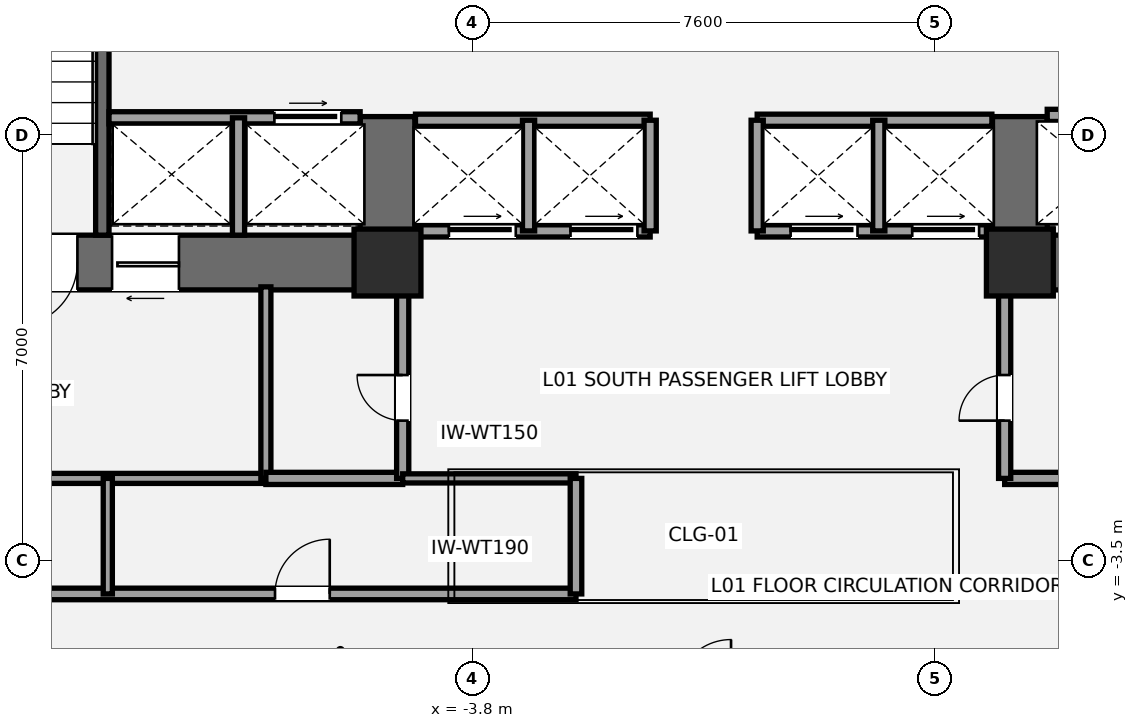
"""IFC4 building model, lengths in metres.
Left out: names, types, materials, properties, quantities, classifications, styles, units other than length and angle.
Written with IfcOpenShell. Run it as: python <this file> out.ifc"""

import sys

from ifc_helpers import new_model, si_unit, direction, frame, frame_2d, origin, origin_2d, place, context, subcontext, project, spatial, rectangle, extrude, element, fill, save


model = new_model("IFC4")
c1 = context("Model", 3, precision=1e-05, world=origin(), true_north=direction((0.0, 1.0)))
c2 = subcontext(c1, "Body", "Model", "MODEL_VIEW")
j1 = project(units=[si_unit("LENGTHUNIT", "METRE"), si_unit("PLANEANGLEUNIT", "RADIAN")], contexts=[c1])
p1 = place(None, origin())
s1 = spatial("IfcSite", under=j1, at=p1, CompositionType="ELEMENT")
p2 = place(p1, origin())
s2 = spatial("IfcBuilding", under=s1, at=p2, CompositionType="ELEMENT")
p3 = place(p2, frame((0.0, 0.0, 6.0)))
s3 = spatial("IfcBuildingStorey", under=s2, at=p3, CompositionType="ELEMENT", Elevation=6.0)
p4 = place(p3, frame((-4.75, 1.4, 0.0), z_axis=(0.0, 0.0, 1.0), x_axis=(-1.0, 0.0, 0.0)))
e1 = element("IfcWall", 1, at=p4, inside=s3, PredefinedType="SHEAR", context=c2, shape_type="SweptSolid", body=[
    extrude(rectangle(XDim=9.3, YDim=0.9, at=frame_2d((4.65, 0.0))), origin(), (0.0, 0.0, 1.0), 4.2),
])
p5 = place(p4, frame((5.55, 0.0, 0.0)))
e2 = element("IfcOpeningElement", 2, at=p5, cuts=e1, PredefinedType="OPENING", context=c2, shape_type="SweptSolid", body=[
    extrude(rectangle(XDim=1.05, YDim=2.15, at=frame_2d((0.525, 1.075))), frame((0.0, 0.46, 0.0), z_axis=(0.0, -1.0, 0.0), x_axis=(1.0, 0.0, 0.0)), (0.0, 0.0, 1.0), 0.92),
])
p6 = place(p4, frame((3.88, 0.0, 0.0)))
e3 = element("IfcOpeningElement", 3, at=p6, cuts=e1, PredefinedType="OPENING", context=c2, shape_type="SweptSolid", body=[
    extrude(rectangle(XDim=1.1, YDim=2.2, at=frame_2d((0.55, 1.1))), frame((0.0, 0.46, 0.0), z_axis=(0.0, -1.0, 0.0), x_axis=(1.0, 0.0, 0.0)), (0.0, 0.0, 1.0), 0.92),
])
p7 = place(p3, frame((-5.2, 0.95, 0.0), z_axis=(0.0, 0.0, 1.0), x_axis=(0.0, 1.0, 0.0)))
e4 = element("IfcWall", 4, at=p7, inside=s3, PredefinedType="SHEAR", context=c2, shape_type="SweptSolid", body=[
    extrude(rectangle(XDim=2.85, YDim=0.9, at=frame_2d((1.425, 0.0))), origin(), (0.0, 0.0, 1.0), 4.2),
])
p8 = place(p3, frame((-9.89, 1.85, 0.0), z_axis=(0.0, 0.0, 1.0), x_axis=(0.0, 1.0, 0.0)))
e5 = element("IfcWall", 5, at=p8, inside=s3, PredefinedType="SHEAR", context=c2, shape_type="SweptSolid", body=[
    extrude(rectangle(XDim=7.15, YDim=0.22, at=frame_2d((3.575, 0.0))), origin(), (0.0, 0.0, 1.0), 4.2),
])
p9 = place(p3, frame((14.05, 1.4, 0.0), z_axis=(0.0, 0.0, 1.0), x_axis=(-1.0, 0.0, 0.0)))
e6 = element("IfcWall", 6, at=p9, inside=s3, PredefinedType="SHEAR", context=c2, shape_type="SweptSolid", body=[
    extrude(rectangle(XDim=9.3, YDim=0.9, at=frame_2d((4.65, 0.0))), origin(), (0.0, 0.0, 1.0), 4.2),
])
p10 = place(p9, frame((2.7, 0.0, 0.0)))
e7 = element("IfcOpeningElement", 7, at=p10, cuts=e6, PredefinedType="OPENING", context=c2, shape_type="SweptSolid", body=[
    extrude(rectangle(XDim=1.05, YDim=2.15, at=frame_2d((0.525, 1.075))), frame((0.0, 0.46, 0.0), z_axis=(0.0, -1.0, 0.0), x_axis=(1.0, 0.0, 0.0)), (0.0, 0.0, 1.0), 0.92),
])
p11 = place(p9, frame((4.7, 0.0, 0.0)))
e8 = element("IfcOpeningElement", 8, at=p11, cuts=e6, PredefinedType="OPENING", context=c2, shape_type="SweptSolid", body=[
    extrude(rectangle(XDim=1.1, YDim=2.2, at=frame_2d((0.55, 1.1))), frame((0.0, 0.46, 0.0), z_axis=(0.0, -1.0, 0.0), x_axis=(1.0, 0.0, 0.0)), (0.0, 0.0, 1.0), 0.92),
])
p12 = place(p3, frame((5.2, 0.95, 0.0), z_axis=(0.0, 0.0, 1.0), x_axis=(0.0, 1.0, 0.0)))
e9 = element("IfcWall", 9, at=p12, inside=s3, PredefinedType="SHEAR", context=c2, shape_type="SweptSolid", body=[
    extrude(rectangle(XDim=2.85, YDim=0.9, at=frame_2d((1.425, 0.0))), origin(), (0.0, 0.0, 1.0), 4.2),
])
for number, where, z_axis, x_axis in (
    (10, (-5.2, 1.4, 0.0), (0.0, 0.0, 1.0), (1.0, 0.0, 0.0)),
    (11, (5.2, 1.4, 0.0), (0.0, 0.0, 1.0), (1.0, 0.0, 0.0)),
):
    element("IfcColumn", number, at=place(p3, frame(where, z_axis=z_axis, x_axis=x_axis)), inside=s3, PredefinedType="COLUMN", context=c2, shape_type="SweptSolid", body=[
        extrude(rectangle(XDim=1.1, YDim=1.1, at=origin_2d()), origin(), (0.0, 0.0, 1.0), 4.2),
    ])
p13 = place(p3, frame((-13.45, -2.15, 0.0), z_axis=(0.0, 0.0, 1.0), x_axis=(1.0, 0.0, 0.0)))
e12 = element("IfcWall", 12, at=p13, inside=s3, PredefinedType="PARTITIONING", context=c2, shape_type="SweptSolid", body=[
    extrude(rectangle(XDim=6.25, YDim=0.165, at=frame_2d((3.125, 0.0))), origin(), (0.0, 0.0, 1.0), 3.98),
])
p14 = place(p3, frame((-7.2, -2.15, 0.0), z_axis=(0.0, 0.0, 1.0), x_axis=(0.0, 1.0, 0.0)))
e13 = element("IfcWall", 13, at=p14, inside=s3, PredefinedType="PARTITIONING", context=c2, shape_type="SweptSolid", body=[
    extrude(rectangle(XDim=3.15, YDim=0.165, at=frame_2d((1.575, 0.0))), origin(), (0.0, 0.0, 1.0), 3.98),
])
p15 = place(p3, frame((-7.2, -2.15, 0.0), z_axis=(0.0, 0.0, 1.0), x_axis=(1.0, 0.0, 0.0)))
e14 = element("IfcWall", 14, at=p15, inside=s3, PredefinedType="SOLIDWALL", context=c2, shape_type="SweptSolid", body=[
    extrude(rectangle(XDim=2.25, YDim=0.2, at=frame_2d((1.125, 0.0))), origin(), (0.0, 0.0, 1.0), 3.98),
])
p16 = place(p3, frame((-4.95, -2.15, 0.0), z_axis=(0.0, 0.0, 1.0), x_axis=(0.0, 1.0, 0.0)))
e15 = element("IfcWall", 15, at=p16, inside=s3, PredefinedType="SOLIDWALL", context=c2, shape_type="SweptSolid", body=[
    extrude(rectangle(XDim=3.15, YDim=0.2, at=frame_2d((1.575, 0.0))), origin(), (0.0, 0.0, 1.0), 3.348),
])
p17 = place(p16, frame((0.95, 0.0, 0.0)))
e16 = element("IfcOpeningElement", 16, at=p17, cuts=e15, PredefinedType="OPENING", context=c2, shape_type="SweptSolid", body=[
    extrude(rectangle(XDim=0.75, YDim=2.1, at=frame_2d((0.375, 1.05))), frame((0.0, 0.11, 0.0), z_axis=(0.0, -1.0, 0.0), x_axis=(1.0, 0.0, 0.0)), (0.0, 0.0, 1.0), 0.22),
])
p18 = place(p3, frame((4.95, -2.15, 0.0), z_axis=(0.0, 0.0, 1.0), x_axis=(1.0, 0.0, 0.0)))
e17 = element("IfcWall", 17, at=p18, inside=s3, PredefinedType="SOLIDWALL", context=c2, shape_type="SweptSolid", body=[
    extrude(rectangle(XDim=2.25, YDim=0.2, at=frame_2d((1.125, 0.0))), origin(), (0.0, 0.0, 1.0), 3.98),
])
p19 = place(p3, frame((4.95, -2.15, 0.0), z_axis=(0.0, 0.0, 1.0), x_axis=(0.0, 1.0, 0.0)))
e18 = element("IfcWall", 18, at=p19, inside=s3, PredefinedType="SOLIDWALL", context=c2, shape_type="SweptSolid", body=[
    extrude(rectangle(XDim=3.15, YDim=0.2, at=frame_2d((1.575, 0.0))), origin(), (0.0, 0.0, 1.0), 3.348),
])
p20 = place(p19, frame((0.95, 0.0, 0.0)))
e19 = element("IfcOpeningElement", 19, at=p20, cuts=e18, PredefinedType="OPENING", context=c2, shape_type="SweptSolid", body=[
    extrude(rectangle(XDim=0.75, YDim=2.1, at=frame_2d((0.375, 1.05))), frame((0.0, 0.11, 0.0), z_axis=(0.0, -1.0, 0.0), x_axis=(1.0, 0.0, 0.0)), (0.0, 0.0, 1.0), 0.22),
])
p21 = place(p3, frame((-9.78, 3.78, 0.0), z_axis=(0.0, 0.0, 1.0), x_axis=(1.0, 0.0, 0.0)))
e20 = element("IfcWall", 20, at=p21, inside=s3, PredefinedType="SOLIDWALL", context=c2, shape_type="SweptSolid", body=[
    extrude(rectangle(XDim=4.13, YDim=0.2, at=frame_2d((2.065, 0.0))), origin(), (0.0, 0.0, 1.0), 3.98),
])
p22 = place(p21, frame((2.72, 0.0, 0.0)))
e21 = element("IfcOpeningElement", 21, at=p22, cuts=e20, PredefinedType="OPENING", context=c2, shape_type="SweptSolid", body=[
    extrude(rectangle(XDim=1.1, YDim=2.2, at=frame_2d((0.55, 1.1))), frame((0.0, 0.11, 0.0), z_axis=(0.0, -1.0, 0.0), x_axis=(1.0, 0.0, 0.0)), (0.0, 0.0, 1.0), 0.22),
])
p23 = place(p3, frame((-7.65, 1.85, 0.0), z_axis=(0.0, 0.0, 1.0), x_axis=(0.0, 1.0, 0.0)))
e22 = element("IfcWall", 22, at=p23, inside=s3, PredefinedType="SOLIDWALL", context=c2, shape_type="SweptSolid", body=[
    extrude(rectangle(XDim=1.93, YDim=0.2, at=frame_2d((0.965, 0.0))), origin(), (0.0, 0.0, 1.0), 3.98),
])
p24 = place(p3, frame((5.65, 3.82, 0.0), z_axis=(0.0, 0.0, 1.0), x_axis=(1.0, 0.0, 0.0)))
e23 = element("IfcWall", 23, at=p24, inside=s3, PredefinedType="SOLIDWALL", context=c2, shape_type="SweptSolid", body=[
    extrude(rectangle(XDim=4.13, YDim=0.2, at=frame_2d((2.065, 0.0))), origin(), (0.0, 0.0, 1.0), 3.98),
])
p25 = place(p24, frame((0.65, 0.0, 0.0)))
e24 = element("IfcOpeningElement", 24, at=p25, cuts=e23, PredefinedType="OPENING", context=c2, shape_type="SweptSolid", body=[
    extrude(rectangle(XDim=1.2, YDim=2.2, at=frame_2d((0.6, 1.1))), frame((0.0, 0.11, 0.0), z_axis=(0.0, -1.0, 0.0), x_axis=(1.0, 0.0, 0.0)), (0.0, 0.0, 1.0), 0.22),
])
p26 = place(p3, frame((-4.74, 1.92, 0.0), z_axis=(0.0, 0.0, 1.0), x_axis=(1.0, 0.0, 0.0)))
e25 = element("IfcWall", 25, at=p26, inside=s3, PredefinedType="SOLIDWALL", context=c2, shape_type="SweptSolid", body=[
    extrude(rectangle(XDim=3.86, YDim=0.2, at=frame_2d((1.93, 0.0))), origin(), (0.0, 0.0, 1.0), 2.97),
])
p27 = place(p26, frame((0.55, 0.0, 0.0)))
e26 = element("IfcOpeningElement", 26, at=p27, cuts=e25, PredefinedType="OPENING", context=c2, shape_type="SweptSolid", body=[
    extrude(rectangle(XDim=1.1, YDim=2.2, at=frame_2d((0.55, 1.1))), frame((0.0, 0.11, 0.0), z_axis=(0.0, -1.0, 0.0), x_axis=(1.0, 0.0, 0.0)), (0.0, 0.0, 1.0), 0.22),
])
p28 = place(p26, frame((2.55, 0.0, 0.0)))
e27 = element("IfcOpeningElement", 27, at=p28, cuts=e25, PredefinedType="OPENING", context=c2, shape_type="SweptSolid", body=[
    extrude(rectangle(XDim=1.1, YDim=2.2, at=frame_2d((0.55, 1.1))), frame((0.0, 0.11, 0.0), z_axis=(0.0, -1.0, 0.0), x_axis=(1.0, 0.0, 0.0)), (0.0, 0.0, 1.0), 0.22),
])
p29 = place(p3, frame((0.88, 1.92, 0.0), z_axis=(0.0, 0.0, 1.0), x_axis=(1.0, 0.0, 0.0)))
e28 = element("IfcWall", 28, at=p29, inside=s3, PredefinedType="SOLIDWALL", context=c2, shape_type="SweptSolid", body=[
    extrude(rectangle(XDim=3.86, YDim=0.2, at=frame_2d((1.93, 0.0))), origin(), (0.0, 0.0, 1.0), 2.97),
])
p30 = place(p29, frame((0.55, 0.0, 0.0)))
e29 = element("IfcOpeningElement", 29, at=p30, cuts=e28, PredefinedType="OPENING", context=c2, shape_type="SweptSolid", body=[
    extrude(rectangle(XDim=1.1, YDim=2.2, at=frame_2d((0.55, 1.1))), frame((0.0, 0.11, 0.0), z_axis=(0.0, -1.0, 0.0), x_axis=(1.0, 0.0, 0.0)), (0.0, 0.0, 1.0), 0.22),
])
p31 = place(p29, frame((2.55, 0.0, 0.0)))
e30 = element("IfcOpeningElement", 30, at=p31, cuts=e28, PredefinedType="OPENING", context=c2, shape_type="SweptSolid", body=[
    extrude(rectangle(XDim=1.1, YDim=2.2, at=frame_2d((0.55, 1.1))), frame((0.0, 0.11, 0.0), z_axis=(0.0, -1.0, 0.0), x_axis=(1.0, 0.0, 0.0)), (0.0, 0.0, 1.0), 0.22),
])
for number, where, z_axis, x_axis in (
    (31, (-4.74, 3.74, 0.0), (0.0, 0.0, 1.0), (1.0, 0.0, 0.0)),
    (32, (0.88, 3.74, 0.0), (0.0, 0.0, 1.0), (1.0, 0.0, 0.0)),
):
    element("IfcWall", number, at=place(p3, frame(where, z_axis=z_axis, x_axis=x_axis)), inside=s3, PredefinedType="SOLIDWALL", context=c2, shape_type="SweptSolid", body=[
        extrude(rectangle(XDim=3.86, YDim=0.2, at=frame_2d((1.93, 0.0))), origin(), (0.0, 0.0, 1.0), 3.98),
    ])
for number, where, z_axis, x_axis in (
    (33, (-2.88, 1.92, 0.0), (0.0, 0.0, 1.0), (0.0, 1.0, 0.0)),
    (34, (2.88, 1.92, 0.0), (0.0, 0.0, 1.0), (0.0, 1.0, 0.0)),
    (35, (-0.88, 1.92, 0.0), (0.0, 0.0, 1.0), (0.0, 1.0, 0.0)),
    (36, (0.88, 1.92, 0.0), (0.0, 0.0, 1.0), (0.0, 1.0, 0.0)),
):
    element("IfcWall", number, at=place(p3, frame(where, z_axis=z_axis, x_axis=x_axis)), inside=s3, PredefinedType="SOLIDWALL", context=c2, shape_type="SweptSolid", body=[
        extrude(rectangle(XDim=1.82, YDim=0.2, at=frame_2d((0.91, 0.0))), origin(), (0.0, 0.0, 1.0), 3.98),
    ])
p32 = place(p3, frame((-13.45, -4.05, 0.0), z_axis=(0.0, 0.0, 1.0), x_axis=(1.0, 0.0, 0.0)))
e37 = element("IfcWall", 37, at=p32, inside=s3, PredefinedType="PLUMBINGWALL", context=c2, shape_type="SweptSolid", body=[
    extrude(rectangle(XDim=11.35, YDim=0.19, at=frame_2d((5.675, 0.0))), origin(), (0.0, 0.0, 1.0), 3.507),
])
p33 = place(p32, frame((1.25, 0.0, 0.0)))
e38 = element("IfcOpeningElement", 38, at=p33, cuts=e37, PredefinedType="OPENING", context=c2, shape_type="SweptSolid", body=[
    extrude(rectangle(XDim=0.95, YDim=2.15, at=frame_2d((0.475, 1.075))), frame((0.0, 0.105, 0.0), z_axis=(0.0, -1.0, 0.0), x_axis=(1.0, 0.0, 0.0)), (0.0, 0.0, 1.0), 0.21),
])
p34 = place(p32, frame((6.4, 0.0, 0.0)))
e39 = element("IfcOpeningElement", 39, at=p34, cuts=e37, PredefinedType="OPENING", context=c2, shape_type="SweptSolid", body=[
    extrude(rectangle(XDim=0.9, YDim=2.1, at=frame_2d((0.45, 1.05))), frame((0.0, 0.105, 0.0), z_axis=(0.0, -1.0, 0.0), x_axis=(1.0, 0.0, 0.0)), (0.0, 0.0, 1.0), 0.21),
])
p35 = place(p3, frame((-4.95, -2.15, 0.0), z_axis=(0.0, 0.0, 1.0), x_axis=(1.0, 0.0, 0.0)))
e40 = element("IfcWall", 40, at=p35, inside=s3, PredefinedType="PLUMBINGWALL", context=c2, shape_type="SweptSolid", body=[
    extrude(rectangle(XDim=2.85, YDim=0.15, at=frame_2d((1.425, 0.0))), origin(), (0.0, 0.0, 1.0), 3.98),
])
p36 = place(p3, frame((-2.1, -4.05, 0.0), z_axis=(0.0, 0.0, 1.0), x_axis=(0.0, 1.0, 0.0)))
e41 = element("IfcWall", 41, at=p36, inside=s3, PredefinedType="PLUMBINGWALL", context=c2, shape_type="SweptSolid", body=[
    extrude(rectangle(XDim=1.9, YDim=0.19, at=frame_2d((0.95, 0.0))), origin(), (0.0, 0.0, 1.0), 3.98),
])
p37 = place(p3, frame((-9.8, -4.05, 0.0), z_axis=(0.0, 0.0, 1.0), x_axis=(0.0, 1.0, 0.0)))
e42 = element("IfcWall", 42, at=p37, inside=s3, PredefinedType="PLUMBINGWALL", context=c2, shape_type="SweptSolid", body=[
    extrude(rectangle(XDim=1.9, YDim=0.15, at=frame_2d((0.95, 0.0))), origin(), (0.0, 0.0, 1.0), 3.98),
])
p38 = place(p5, origin())
e43 = element("IfcDoor", 43, at=p38, inside=s3, OperationType="SINGLE_SWING_RIGHT", PredefinedType="DOOR", context=c2, shape_type="SweptSolid", body=[
    extrude(rectangle(XDim=1.05, YDim=2.15, at=frame_2d((0.525, 1.075))), frame((0.0, 0.025, 0.0), z_axis=(0.0, -1.0, 0.0), x_axis=(1.0, 0.0, 0.0)), (0.0, 0.0, 1.0), 0.05),
])
fill(e2, e43)
p39 = place(p17, origin())
e44 = element("IfcDoor", 44, at=p39, inside=s3, OperationType="SINGLE_SWING_RIGHT", PredefinedType="DOOR", context=c2, shape_type="SweptSolid", body=[
    extrude(rectangle(XDim=0.75, YDim=2.1, at=frame_2d((0.375, 1.05))), frame((0.0, 0.025, 0.0), z_axis=(0.0, -1.0, 0.0), x_axis=(1.0, 0.0, 0.0)), (0.0, 0.0, 1.0), 0.05),
])
fill(e16, e44)
p40 = place(p20, origin())
e45 = element("IfcDoor", 45, at=p40, inside=s3, OperationType="SINGLE_SWING_LEFT", PredefinedType="DOOR", context=c2, shape_type="SweptSolid", body=[
    extrude(rectangle(XDim=0.75, YDim=2.1, at=frame_2d((0.375, 1.05))), frame((0.0, 0.025, 0.0), z_axis=(0.0, -1.0, 0.0), x_axis=(1.0, 0.0, 0.0)), (0.0, 0.0, 1.0), 0.05),
])
fill(e19, e45)
p41 = place(p6, origin())
e46 = element("IfcDoor", 46, at=p41, inside=s3, OperationType="SLIDING_TO_LEFT", PredefinedType="DOOR", context=c2, shape_type="SweptSolid", body=[
    extrude(rectangle(XDim=1.1, YDim=2.2, at=frame_2d((0.55, 1.1))), frame((0.0, 0.025, 0.0), z_axis=(0.0, -1.0, 0.0), x_axis=(1.0, 0.0, 0.0)), (0.0, 0.0, 1.0), 0.05),
])
fill(e3, e46)
p42 = place(p22, origin())
e47 = element("IfcDoor", 47, at=p42, inside=s3, OperationType="SLIDING_TO_LEFT", PredefinedType="DOOR", context=c2, shape_type="SweptSolid", body=[
    extrude(rectangle(XDim=1.1, YDim=2.2, at=frame_2d((0.55, 1.1))), frame((0.0, 0.025, 0.0), z_axis=(0.0, -1.0, 0.0), x_axis=(1.0, 0.0, 0.0)), (0.0, 0.0, 1.0), 0.05),
])
fill(e21, e47)
p43 = place(p27, origin())
e48 = element("IfcDoor", 48, at=p43, inside=s3, OperationType="SLIDING_TO_LEFT", PredefinedType="DOOR", context=c2, shape_type="SweptSolid", body=[
    extrude(rectangle(XDim=1.1, YDim=2.2, at=frame_2d((0.55, 1.1))), frame((0.0, 0.025, 0.0), z_axis=(0.0, -1.0, 0.0), x_axis=(1.0, 0.0, 0.0)), (0.0, 0.0, 1.0), 0.05),
])
fill(e26, e48)
p44 = place(p28, origin())
e49 = element("IfcDoor", 49, at=p44, inside=s3, OperationType="SLIDING_TO_LEFT", PredefinedType="DOOR", context=c2, shape_type="SweptSolid", body=[
    extrude(rectangle(XDim=1.1, YDim=2.2, at=frame_2d((0.55, 1.1))), frame((0.0, 0.025, 0.0), z_axis=(0.0, -1.0, 0.0), x_axis=(1.0, 0.0, 0.0)), (0.0, 0.0, 1.0), 0.05),
])
fill(e27, e49)
p45 = place(p30, origin())
e50 = element("IfcDoor", 50, at=p45, inside=s3, OperationType="SLIDING_TO_LEFT", PredefinedType="DOOR", context=c2, shape_type="SweptSolid", body=[
    extrude(rectangle(XDim=1.1, YDim=2.2, at=frame_2d((0.55, 1.1))), frame((0.0, 0.025, 0.0), z_axis=(0.0, -1.0, 0.0), x_axis=(1.0, 0.0, 0.0)), (0.0, 0.0, 1.0), 0.05),
])
fill(e29, e50)
p46 = place(p31, origin())
e51 = element("IfcDoor", 51, at=p46, inside=s3, OperationType="SLIDING_TO_LEFT", PredefinedType="DOOR", context=c2, shape_type="SweptSolid", body=[
    extrude(rectangle(XDim=1.1, YDim=2.2, at=frame_2d((0.55, 1.1))), frame((0.0, 0.025, 0.0), z_axis=(0.0, -1.0, 0.0), x_axis=(1.0, 0.0, 0.0)), (0.0, 0.0, 1.0), 0.05),
])
fill(e30, e51)
p47 = place(p34, origin())
e52 = element("IfcDoor", 52, at=p47, inside=s3, OperationType="SINGLE_SWING_RIGHT", PredefinedType="DOOR", context=c2, shape_type="SweptSolid", body=[
    extrude(rectangle(XDim=0.9, YDim=2.1, at=frame_2d((0.45, 1.05))), frame((0.0, 0.025, 0.0), z_axis=(0.0, -1.0, 0.0), x_axis=(1.0, 0.0, 0.0)), (0.0, 0.0, 1.0), 0.05),
])
fill(e39, e52)
save(model, sys.argv[1])
